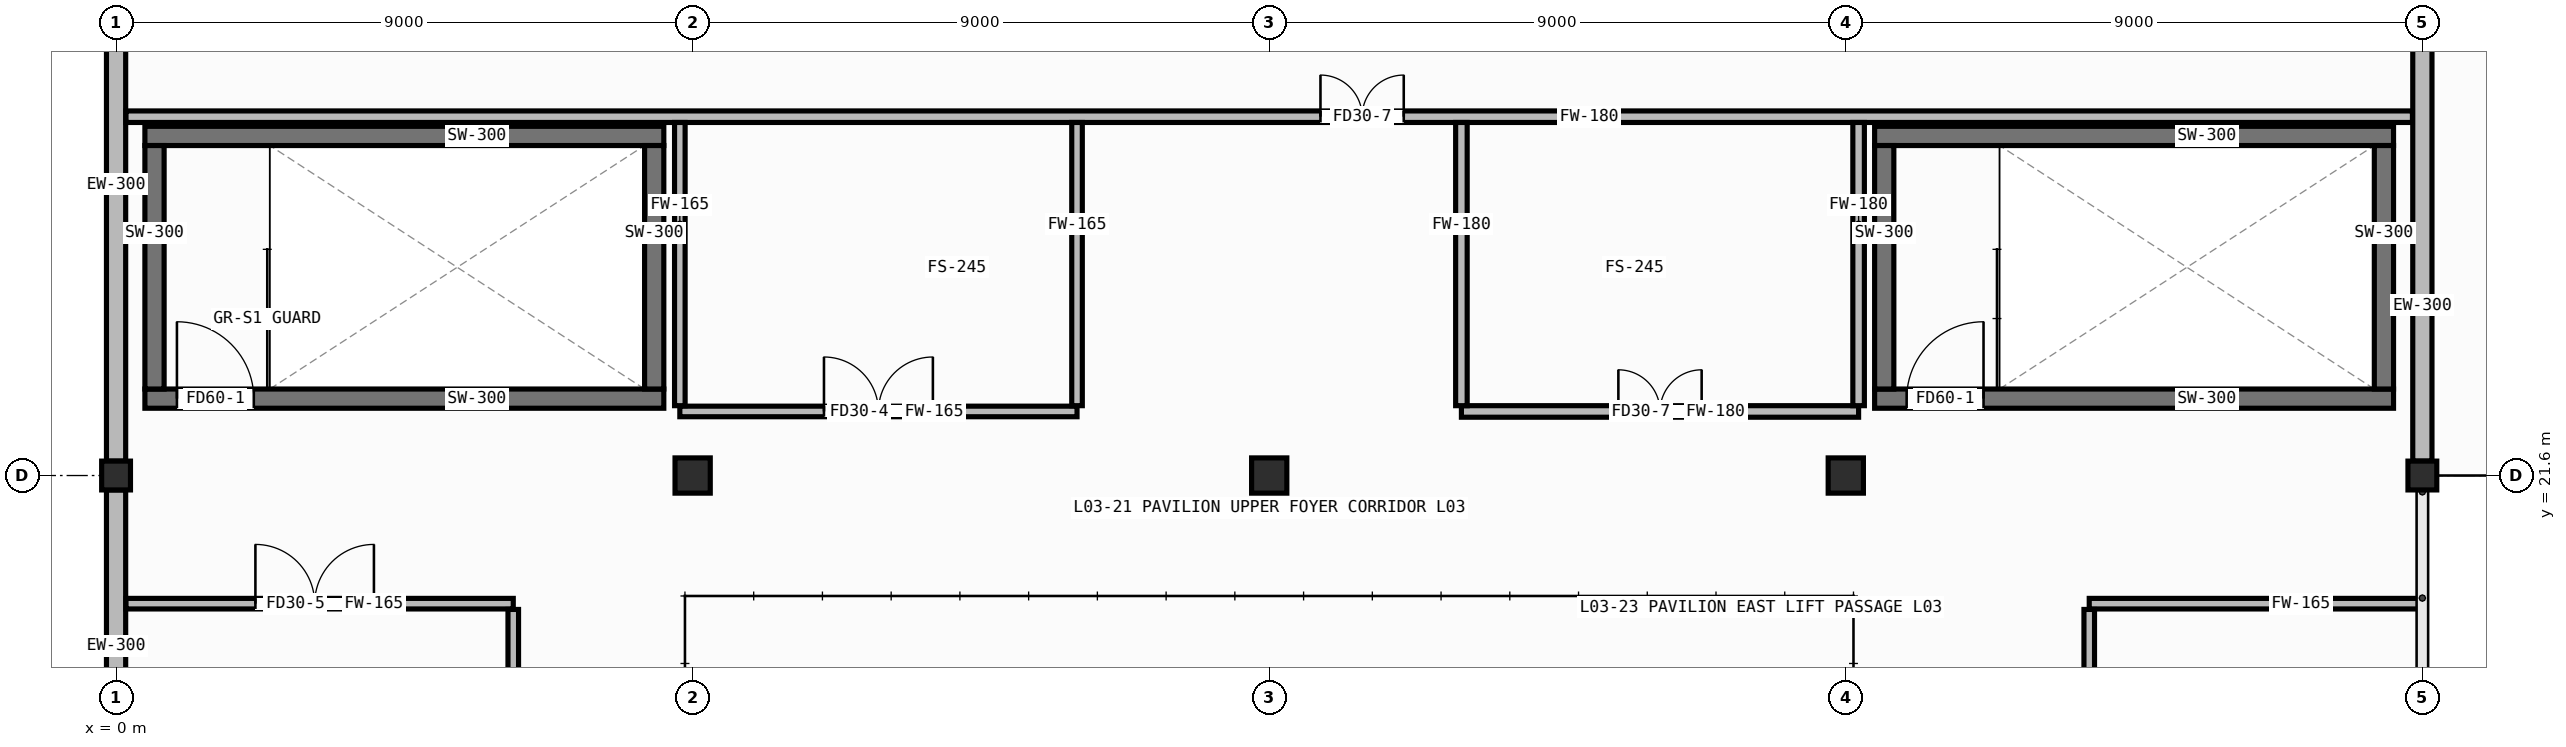
"""IFC4 building model, lengths in metres.
Left out: names, types, materials, properties, quantities, classifications, styles, units other than length and angle.
Written with IfcOpenShell. Run it as: python <this file> out.ifc"""

import sys

from ifc_helpers import new_model, si_unit, direction, frame, frame_2d, origin, origin_2d, place, context, subcontext, project, spatial, rectangle, hollow_rectangle, extrude, element, fill, save


model = new_model("IFC4")
c1 = context("Model", 3, precision=1e-05, world=origin(), true_north=direction((0.0, 1.0)))
c2 = subcontext(c1, "Body", "Model", "MODEL_VIEW")
j1 = project(units=[si_unit("LENGTHUNIT", "METRE"), si_unit("PLANEANGLEUNIT", "RADIAN")], contexts=[c1])
p1 = place(None, origin())
s1 = spatial("IfcSite", under=j1, at=p1, CompositionType="ELEMENT")
p2 = place(p1, origin())
s2 = spatial("IfcBuilding", under=s1, at=p2, CompositionType="ELEMENT")
p3 = place(p2, frame((0.0, 0.0, 8.8)))
s3 = spatial("IfcBuildingStorey", under=s2, at=p3, CompositionType="ELEMENT", Elevation=8.8)
p4 = place(p3, frame((0.0, 21.6, 0.0), z_axis=(0.0, 0.0, 1.0), x_axis=(1.0, 0.0, 0.0)))
e1 = element("IfcColumn", 1, at=p4, inside=s3, PredefinedType="COLUMN", context=c2, shape_type="SweptSolid", body=[
    extrude(hollow_rectangle(XDim=0.45, YDim=0.45, WallThickness=0.019, at=origin_2d()), origin(), (0.0, 0.0, 1.0), 3.58),
])
for number, where, z_axis, x_axis in (
    (2, (9.0, 21.6, 0.0), (0.0, 0.0, 1.0), (1.0, 0.0, 0.0)),
    (3, (18.0, 21.6, 0.0), (0.0, 0.0, 1.0), (1.0, 0.0, 0.0)),
    (4, (27.0, 21.6, 0.0), (0.0, 0.0, 1.0), (1.0, 0.0, 0.0)),
):
    element("IfcColumn", number, at=place(p3, frame(where, z_axis=z_axis, x_axis=x_axis)), inside=s3, PredefinedType="COLUMN", context=c2, shape_type="SweptSolid", body=[
        extrude(hollow_rectangle(XDim=0.55, YDim=0.55, WallThickness=0.022, at=origin_2d()), origin(), (0.0, 0.0, 1.0), 3.58),
    ])
p5 = place(p3, frame((36.0, 21.6, 0.0), z_axis=(0.0, 0.0, 1.0), x_axis=(1.0, 0.0, 0.0)))
e5 = element("IfcColumn", 5, at=p5, inside=s3, PredefinedType="COLUMN", context=c2, shape_type="SweptSolid", body=[
    extrude(hollow_rectangle(XDim=0.45, YDim=0.45, WallThickness=0.019, at=origin_2d()), origin(), (0.0, 0.0, 1.0), 3.58),
])
for number, where, z_axis, x_axis in (
    (6, (0.0, 14.625, 0.0), (0.0, 0.0, 1.0), (0.0, 1.0, 0.0)),
    (7, (0.0, 21.825, 0.0), (0.0, 0.0, 1.0), (0.0, 1.0, 0.0)),
    (8, (36.0, 28.575, 0.0), (0.0, 0.0, 1.0), (0.0, -1.0, 0.0)),
):
    element("IfcWall", number, at=place(p3, frame(where, z_axis=z_axis, x_axis=x_axis)), inside=s3, PredefinedType="STANDARD", context=c2, shape_type="SweptSolid", body=[
        extrude(rectangle(XDim=6.75, YDim=0.3, at=frame_2d((3.375, 0.0))), origin(), (0.0, 0.0, 1.0), 3.13),
    ])
p6 = place(p3, frame((0.45, 22.8, 0.0), z_axis=(0.0, 0.0, 1.0), x_axis=(1.0, 0.0, 0.0)))
e9 = element("IfcWall", 9, at=p6, inside=s3, PredefinedType="SHEAR", context=c2, shape_type="SweptSolid", body=[
    extrude(rectangle(XDim=8.1, YDim=0.3, at=frame_2d((4.05, 0.0))), origin(), (0.0, 0.0, 1.0), 3.58),
])
p7 = place(p6, frame((0.5, 0.0, 0.0)))
e10 = element("IfcOpeningElement", 10, at=p7, cuts=e9, PredefinedType="OPENING", context=c2, shape_type="SweptSolid", body=[
    extrude(rectangle(XDim=1.2, YDim=2.1, at=frame_2d((0.6, 1.05))), frame((0.0, 0.162, 0.0), z_axis=(0.0, -1.0, 0.0), x_axis=(1.0, 0.0, 0.0)), (0.0, 0.0, 1.0), 0.324),
])
p8 = place(p3, frame((0.45, 26.9, 0.0), z_axis=(0.0, 0.0, 1.0), x_axis=(1.0, 0.0, 0.0)))
e11 = element("IfcWall", 11, at=p8, inside=s3, PredefinedType="SHEAR", context=c2, shape_type="SweptSolid", body=[
    extrude(rectangle(XDim=8.1, YDim=0.3, at=frame_2d((4.05, 0.0))), origin(), (0.0, 0.0, 1.0), 3.58),
])
for number, where, z_axis, x_axis in (
    (12, (0.6, 22.95, 0.0), (0.0, 0.0, 1.0), (0.0, 1.0, 0.0)),
    (13, (8.4, 22.95, 0.0), (0.0, 0.0, 1.0), (0.0, 1.0, 0.0)),
):
    element("IfcWall", number, at=place(p3, frame(where, z_axis=z_axis, x_axis=x_axis)), inside=s3, PredefinedType="SHEAR", context=c2, shape_type="SweptSolid", body=[
        extrude(rectangle(XDim=3.8, YDim=0.3, at=frame_2d((1.9, 0.0))), origin(), (0.0, 0.0, 1.0), 3.58),
    ])
p9 = place(p3, frame((27.45, 22.8, 0.0), z_axis=(0.0, 0.0, 1.0), x_axis=(1.0, 0.0, 0.0)))
e14 = element("IfcWall", 14, at=p9, inside=s3, PredefinedType="SHEAR", context=c2, shape_type="SweptSolid", body=[
    extrude(rectangle(XDim=8.1, YDim=0.3, at=frame_2d((4.05, 0.0))), origin(), (0.0, 0.0, 1.0), 3.58),
])
p10 = place(p9, frame((0.5, 0.0, 0.0)))
e15 = element("IfcOpeningElement", 15, at=p10, cuts=e14, PredefinedType="OPENING", context=c2, shape_type="SweptSolid", body=[
    extrude(rectangle(XDim=1.2, YDim=2.1, at=frame_2d((0.6, 1.05))), frame((0.0, 0.162, 0.0), z_axis=(0.0, -1.0, 0.0), x_axis=(1.0, 0.0, 0.0)), (0.0, 0.0, 1.0), 0.324),
])
p11 = place(p3, frame((27.45, 26.9, 0.0), z_axis=(0.0, 0.0, 1.0), x_axis=(1.0, 0.0, 0.0)))
e16 = element("IfcWall", 16, at=p11, inside=s3, PredefinedType="SHEAR", context=c2, shape_type="SweptSolid", body=[
    extrude(rectangle(XDim=8.1, YDim=0.3, at=frame_2d((4.05, 0.0))), origin(), (0.0, 0.0, 1.0), 3.58),
])
for number, where, z_axis, x_axis in (
    (17, (27.6, 22.95, 0.0), (0.0, 0.0, 1.0), (0.0, 1.0, 0.0)),
    (18, (35.4, 22.95, 0.0), (0.0, 0.0, 1.0), (0.0, 1.0, 0.0)),
):
    element("IfcWall", number, at=place(p3, frame(where, z_axis=z_axis, x_axis=x_axis)), inside=s3, PredefinedType="SHEAR", context=c2, shape_type="SweptSolid", body=[
        extrude(rectangle(XDim=3.8, YDim=0.3, at=frame_2d((1.9, 0.0))), origin(), (0.0, 0.0, 1.0), 3.58),
    ])
p12 = place(p3, frame((0.155, 19.6, 0.0), z_axis=(0.0, 0.0, 1.0), x_axis=(1.0, 0.0, 0.0)))
e19 = element("IfcWall", 19, at=p12, inside=s3, PredefinedType="PARTITIONING", context=c2, shape_type="SweptSolid", body=[
    extrude(rectangle(XDim=6.045, YDim=0.165, at=frame_2d((3.022, 0.0))), origin(), (0.0, 0.0, 1.0), 3.58),
])
p13 = place(p12, frame((2.02, 0.0, 0.0)))
e20 = element("IfcOpeningElement", 20, at=p13, cuts=e19, PredefinedType="OPENING", context=c2, shape_type="SweptSolid", body=[
    extrude(rectangle(XDim=1.85, YDim=2.12, at=frame_2d((0.925, 1.06))), frame((0.0, 0.094, 0.0), z_axis=(0.0, -1.0, 0.0), x_axis=(1.0, 0.0, 0.0)), (0.0, 0.0, 1.0), 0.189),
])
p14 = place(p3, frame((6.2, 7.29, 0.0), z_axis=(0.0, 0.0, 1.0), x_axis=(0.0, 1.0, 0.0)))
e21 = element("IfcWall", 21, at=p14, inside=s3, PredefinedType="PARTITIONING", context=c2, shape_type="SweptSolid", body=[
    extrude(rectangle(XDim=12.22, YDim=0.165, at=frame_2d((6.11, 0.0))), origin(), (0.0, 0.0, 1.0), 3.58),
])
p15 = place(p3, frame((30.8, 19.6, 0.0), z_axis=(0.0, 0.0, 1.0), x_axis=(1.0, 0.0, 0.0)))
e22 = element("IfcWall", 22, at=p15, inside=s3, PredefinedType="PARTITIONING", context=c2, shape_type="SweptSolid", body=[
    extrude(rectangle(XDim=5.165, YDim=0.165, at=frame_2d((2.583, 0.0))), origin(), (0.0, 0.0, 1.0), 3.58),
])
p16 = place(p3, frame((30.8, 12.09, 0.0), z_axis=(0.0, 0.0, 1.0), x_axis=(0.0, 1.0, 0.0)))
e23 = element("IfcWall", 23, at=p16, inside=s3, PredefinedType="PARTITIONING", context=c2, shape_type="SweptSolid", body=[
    extrude(rectangle(XDim=7.42, YDim=0.165, at=frame_2d((3.71, 0.0))), origin(), (0.0, 0.0, 1.0), 3.58),
])
p17 = place(p16, frame((3.22, 0.0, 0.0)))
e24 = element("IfcOpeningElement", 24, at=p17, cuts=e23, PredefinedType="OPENING", context=c2, shape_type="SweptSolid", body=[
    extrude(rectangle(XDim=0.98, YDim=2.02, at=frame_2d((0.49, 1.01))), frame((0.0, 0.094, 0.0), z_axis=(0.0, -1.0, 0.0), x_axis=(1.0, 0.0, 0.0)), (0.0, 0.0, 1.0), 0.189),
])
p18 = place(p3, frame((0.155, 27.2, 0.0), z_axis=(0.0, 0.0, 1.0), x_axis=(1.0, 0.0, 0.0)))
e25 = element("IfcWall", 25, at=p18, inside=s3, PredefinedType="PARTITIONING", context=c2, shape_type="SweptSolid", body=[
    extrude(rectangle(XDim=35.69, YDim=0.18, at=frame_2d((17.845, 0.0))), origin(), (0.0, 0.0, 1.0), 3.58),
])
p19 = place(p18, frame((18.645, 0.0, 0.0)))
e26 = element("IfcOpeningElement", 26, at=p19, cuts=e25, PredefinedType="OPENING", context=c2, shape_type="SweptSolid", body=[
    extrude(rectangle(XDim=1.3, YDim=2.08, at=frame_2d((0.65, 1.04))), frame((0.0, 0.102, 0.0), z_axis=(0.0, -1.0, 0.0), x_axis=(1.0, 0.0, 0.0)), (0.0, 0.0, 1.0), 0.204),
])
p20 = place(p3, frame((8.8, 22.6, 0.0), z_axis=(0.0, 0.0, 1.0), x_axis=(1.0, 0.0, 0.0)))
e27 = element("IfcWall", 27, at=p20, inside=s3, PredefinedType="PARTITIONING", context=c2, shape_type="SweptSolid", body=[
    extrude(rectangle(XDim=6.2, YDim=0.165, at=frame_2d((3.1, 0.0))), origin(), (0.0, 0.0, 1.0), 3.58),
])
p21 = place(p20, frame((2.25, 0.0, 0.0)))
e28 = element("IfcOpeningElement", 28, at=p21, cuts=e27, PredefinedType="OPENING", context=c2, shape_type="SweptSolid", body=[
    extrude(rectangle(XDim=1.7, YDim=2.12, at=frame_2d((0.85, 1.06))), frame((0.0, 0.094, 0.0), z_axis=(0.0, -1.0, 0.0), x_axis=(1.0, 0.0, 0.0)), (0.0, 0.0, 1.0), 0.189),
])
p22 = place(p3, frame((8.8, 22.69, 0.0), z_axis=(0.0, 0.0, 1.0), x_axis=(0.0, 1.0, 0.0)))
e29 = element("IfcWall", 29, at=p22, inside=s3, PredefinedType="PARTITIONING", context=c2, shape_type="SweptSolid", body=[
    extrude(rectangle(XDim=4.42, YDim=0.165, at=frame_2d((2.21, 0.0))), origin(), (0.0, 0.0, 1.0), 2.86),
])
p23 = place(p3, frame((15.0, 22.69, 0.0), z_axis=(0.0, 0.0, 1.0), x_axis=(0.0, 1.0, 0.0)))
e30 = element("IfcWall", 30, at=p23, inside=s3, PredefinedType="PARTITIONING", context=c2, shape_type="SweptSolid", body=[
    extrude(rectangle(XDim=4.42, YDim=0.165, at=frame_2d((2.21, 0.0))), origin(), (0.0, 0.0, 1.0), 3.58),
])
p24 = place(p3, frame((21.0, 22.6, 0.0), z_axis=(0.0, 0.0, 1.0), x_axis=(1.0, 0.0, 0.0)))
e31 = element("IfcWall", 31, at=p24, inside=s3, PredefinedType="PARTITIONING", context=c2, shape_type="SweptSolid", body=[
    extrude(rectangle(XDim=6.2, YDim=0.18, at=frame_2d((3.1, 0.0))), origin(), (0.0, 0.0, 1.0), 3.58),
])
p25 = place(p24, frame((2.45, 0.0, 0.0)))
e32 = element("IfcOpeningElement", 32, at=p25, cuts=e31, PredefinedType="OPENING", context=c2, shape_type="SweptSolid", body=[
    extrude(rectangle(XDim=1.3, YDim=2.08, at=frame_2d((0.65, 1.04))), frame((0.0, 0.102, 0.0), z_axis=(0.0, -1.0, 0.0), x_axis=(1.0, 0.0, 0.0)), (0.0, 0.0, 1.0), 0.204),
])
p26 = place(p3, frame((21.0, 22.69, 0.0), z_axis=(0.0, 0.0, 1.0), x_axis=(0.0, 1.0, 0.0)))
e33 = element("IfcWall", 33, at=p26, inside=s3, PredefinedType="PARTITIONING", context=c2, shape_type="SweptSolid", body=[
    extrude(rectangle(XDim=4.42, YDim=0.18, at=frame_2d((2.21, 0.0))), origin(), (0.0, 0.0, 1.0), 3.58),
])
p27 = place(p3, frame((27.2, 22.69, 0.0), z_axis=(0.0, 0.0, 1.0), x_axis=(0.0, 1.0, 0.0)))
e34 = element("IfcWall", 34, at=p27, inside=s3, PredefinedType="PARTITIONING", context=c2, shape_type="SweptSolid", body=[
    extrude(rectangle(XDim=4.42, YDim=0.18, at=frame_2d((2.21, 0.0))), origin(), (0.0, 0.0, 1.0), 2.86),
])
p28 = place(p7, origin())
e35 = element("IfcDoor", 35, at=p28, inside=s3, OperationType="SINGLE_SWING_LEFT", PredefinedType="DOOR", context=c2, shape_type="SweptSolid", body=[
    extrude(rectangle(XDim=1.2, YDim=2.1, at=frame_2d((0.6, 1.05))), frame((0.0, 0.025, 0.0), z_axis=(0.0, -1.0, 0.0), x_axis=(1.0, 0.0, 0.0)), (0.0, 0.0, 1.0), 0.05),
])
fill(e10, e35)
p29 = place(p10, origin())
e36 = element("IfcDoor", 36, at=p29, inside=s3, OperationType="SINGLE_SWING_RIGHT", PredefinedType="DOOR", context=c2, shape_type="SweptSolid", body=[
    extrude(rectangle(XDim=1.2, YDim=2.1, at=frame_2d((0.6, 1.05))), frame((0.0, 0.025, 0.0), z_axis=(0.0, -1.0, 0.0), x_axis=(1.0, 0.0, 0.0)), (0.0, 0.0, 1.0), 0.05),
])
fill(e15, e36)
p30 = place(p13, origin())
e37 = element("IfcDoor", 37, at=p30, inside=s3, OperationType="DOUBLE_DOOR_SINGLE_SWING", PredefinedType="DOOR", context=c2, shape_type="SweptSolid", body=[
    extrude(rectangle(XDim=1.85, YDim=2.12, at=frame_2d((0.925, 1.06))), frame((0.0, 0.025, 0.0), z_axis=(0.0, -1.0, 0.0), x_axis=(1.0, 0.0, 0.0)), (0.0, 0.0, 1.0), 0.05),
])
fill(e20, e37)
p31 = place(p19, origin())
e38 = element("IfcDoor", 38, at=p31, inside=s3, OperationType="DOUBLE_DOOR_SINGLE_SWING", PredefinedType="DOOR", context=c2, shape_type="SweptSolid", body=[
    extrude(rectangle(XDim=1.3, YDim=2.08, at=frame_2d((0.65, 1.04))), frame((0.0, 0.025, 0.0), z_axis=(0.0, -1.0, 0.0), x_axis=(1.0, 0.0, 0.0)), (0.0, 0.0, 1.0), 0.05),
])
fill(e26, e38)
p32 = place(p21, origin())
e39 = element("IfcDoor", 39, at=p32, inside=s3, OperationType="DOUBLE_DOOR_SINGLE_SWING", PredefinedType="DOOR", context=c2, shape_type="SweptSolid", body=[
    extrude(rectangle(XDim=1.7, YDim=2.12, at=frame_2d((0.85, 1.06))), frame((0.0, 0.025, 0.0), z_axis=(0.0, -1.0, 0.0), x_axis=(1.0, 0.0, 0.0)), (0.0, 0.0, 1.0), 0.05),
])
fill(e28, e39)
p33 = place(p25, origin())
e40 = element("IfcDoor", 40, at=p33, inside=s3, OperationType="DOUBLE_DOOR_SINGLE_SWING", PredefinedType="DOOR", context=c2, shape_type="SweptSolid", body=[
    extrude(rectangle(XDim=1.3, YDim=2.08, at=frame_2d((0.65, 1.04))), frame((0.0, 0.025, 0.0), z_axis=(0.0, -1.0, 0.0), x_axis=(1.0, 0.0, 0.0)), (0.0, 0.0, 1.0), 0.05),
])
fill(e32, e40)
save(model, sys.argv[1])
